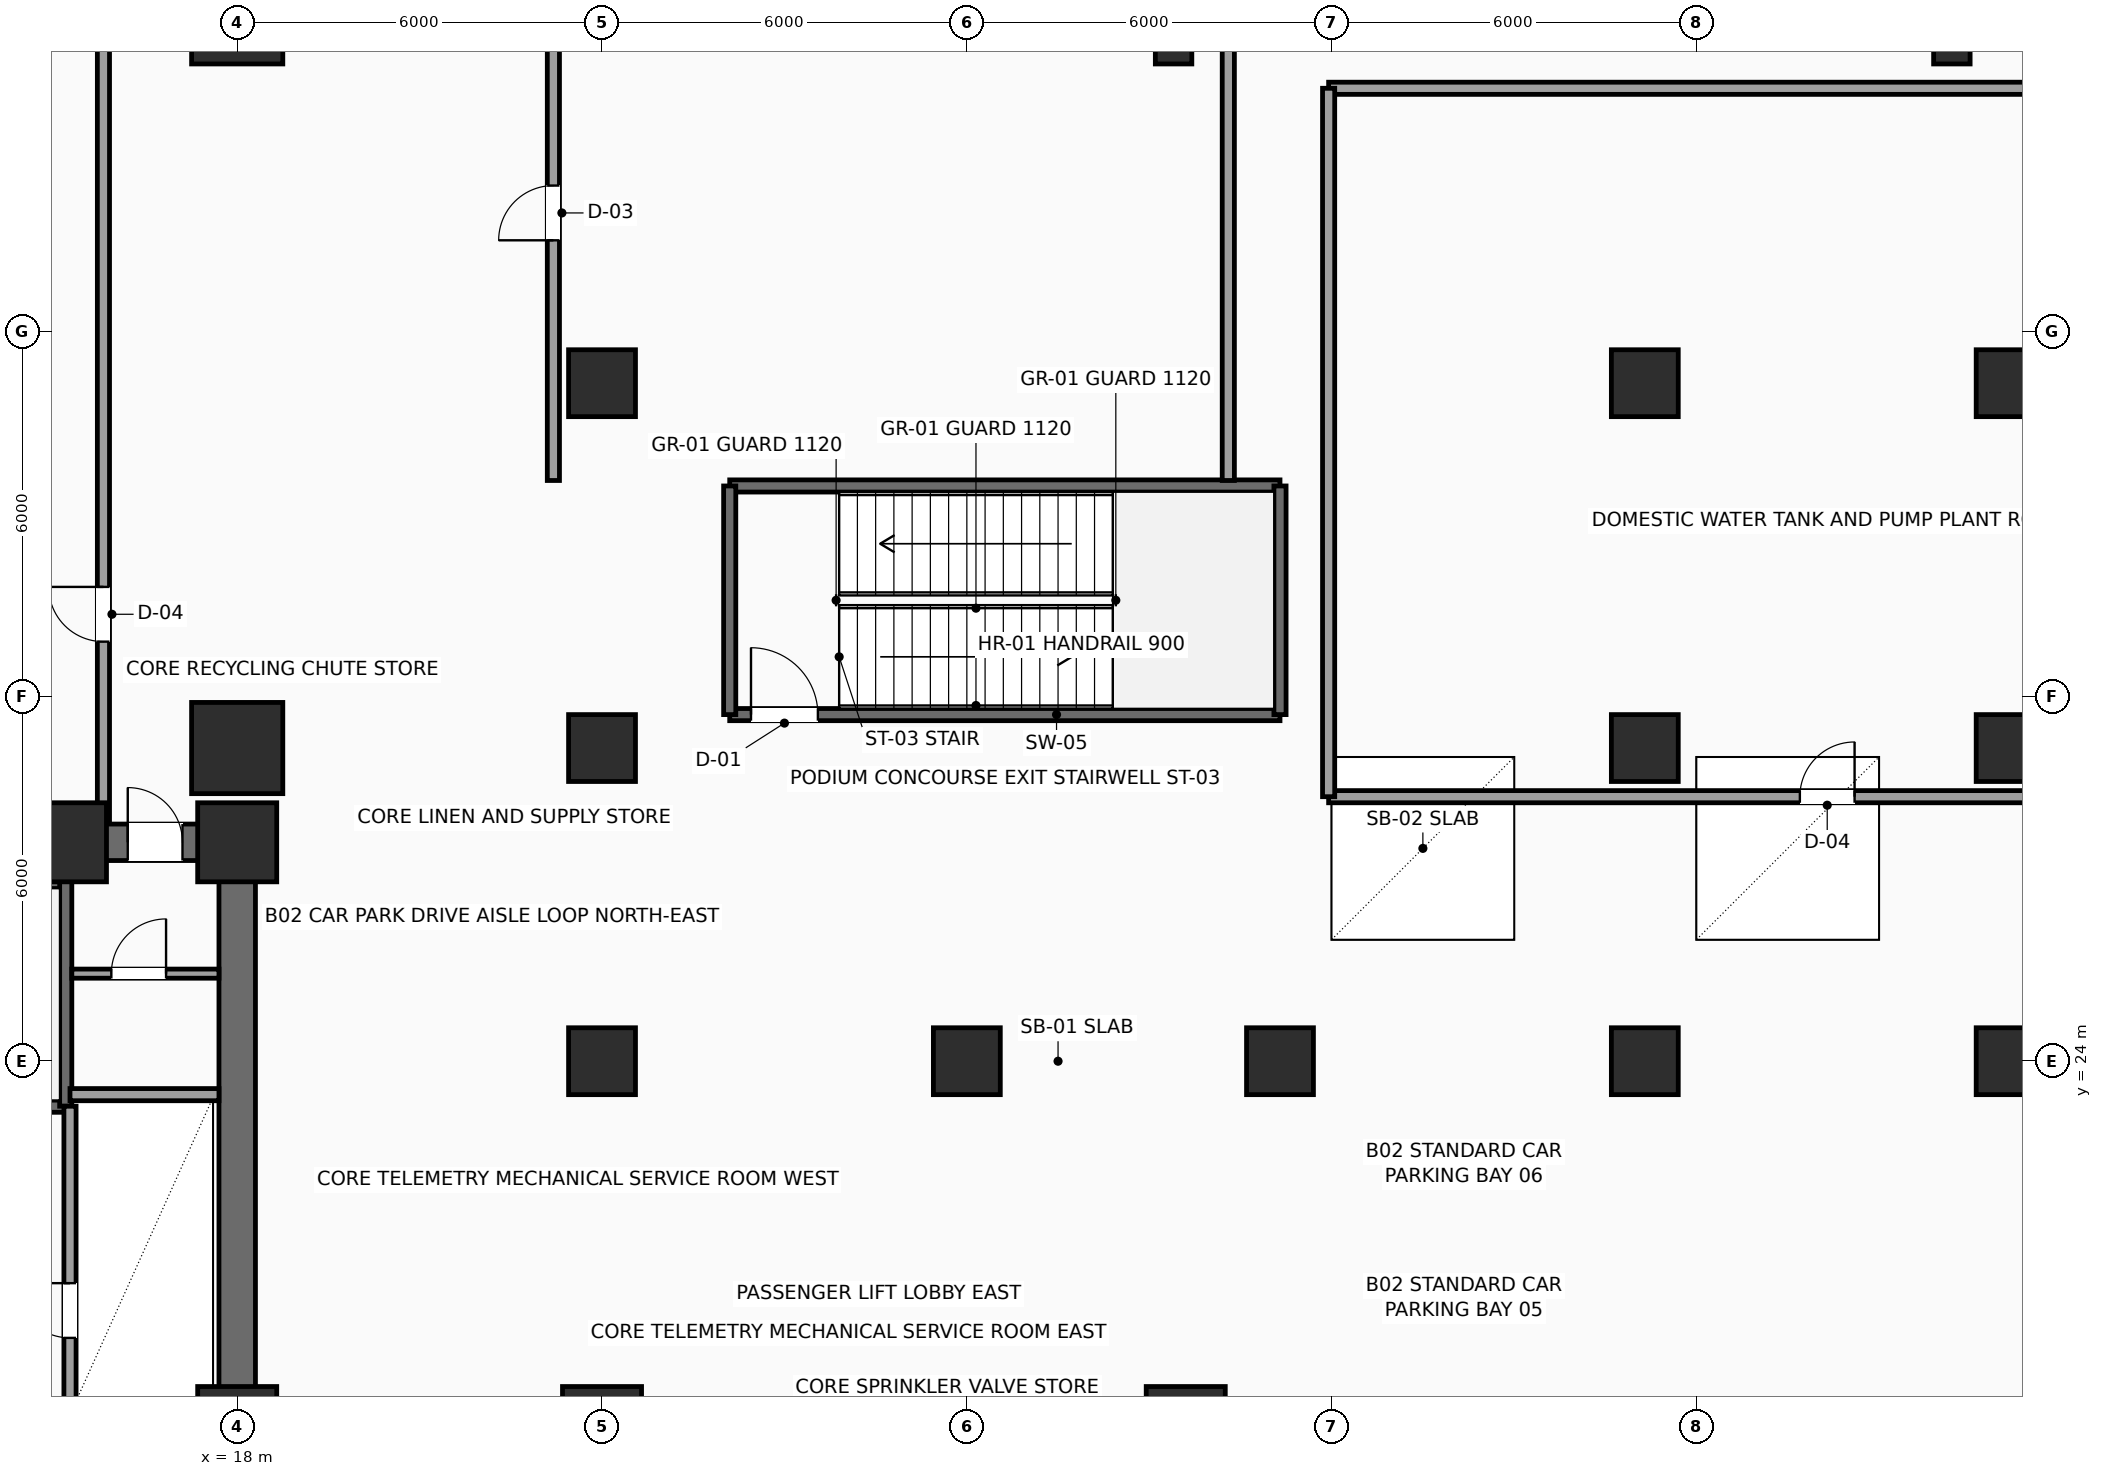
"""IFC4 building model, lengths in metres.
Left out: names, types, materials, properties, quantities, classifications, styles, units other than length and angle.
Written with IfcOpenShell. Run it as: python <this file> out.ifc"""

import sys

from ifc_helpers import new_model, si_unit, direction, frame, frame_2d, origin, origin_2d, place, context, subcontext, project, spatial, rectangle, extrude, element, fill, save


model = new_model("IFC4")
c1 = context("Model", 3, precision=1e-05, world=origin(), true_north=direction((0.0, 1.0)))
c2 = subcontext(c1, "Body", "Model", "MODEL_VIEW")
j1 = project(units=[si_unit("LENGTHUNIT", "METRE"), si_unit("PLANEANGLEUNIT", "RADIAN")], contexts=[c1])
p1 = place(None, origin())
s1 = spatial("IfcSite", under=j1, at=p1, CompositionType="ELEMENT")
p2 = place(p1, origin())
s2 = spatial("IfcBuilding", under=s1, at=p2, CompositionType="ELEMENT")
p3 = place(p2, frame((0.0, 0.0, -9.6)))
s3 = spatial("IfcBuildingStorey", under=s2, at=p3, CompositionType="ELEMENT", Elevation=-9.6)
for number, where, z_axis, x_axis in (
    (1, (18.0, 18.0, 0.0), (0.0, 0.0, 1.0), (1.0, 0.0, 0.0)),
    (2, (15.2, 27.6, 0.0), (0.0, 0.0, 1.0), (1.0, 0.0, 0.0)),
    (3, (18.0, 27.6, 0.0), (0.0, 0.0, 1.0), (1.0, 0.0, 0.0)),
    (4, (24.0, 18.0, 0.0), (0.0, 0.0, 1.0), (1.0, 0.0, 0.0)),
    (5, (33.6, 18.0, 0.0), (0.0, 0.0, 1.0), (1.0, 0.0, 0.0)),
):
    element("IfcColumn", number, at=place(p3, frame(where, z_axis=z_axis, x_axis=x_axis)), inside=s3, PredefinedType="COLUMN", context=c2, shape_type="SweptSolid", body=[
        extrude(rectangle(XDim=1.3, YDim=1.3, at=origin_2d()), origin(), (0.0, 0.0, 1.0), 4.8),
    ])
for number, where, z_axis, x_axis in (
    (6, (18.0, 29.15, 0.0), (0.0, 0.0, 1.0), (1.0, 0.0, 0.0)),
    (7, (18.0, 41.15, 0.0), (0.0, 0.0, 1.0), (1.0, 0.0, 0.0)),
):
    element("IfcColumn", number, at=place(p3, frame(where, z_axis=z_axis, x_axis=x_axis)), inside=s3, PredefinedType="COLUMN", context=c2, shape_type="SweptSolid", body=[
        extrude(rectangle(XDim=1.5, YDim=1.5, at=origin_2d()), origin(), (0.0, 0.0, 1.0), 4.8),
    ])
for number, where, z_axis, x_axis in (
    (8, (24.0, 24.0, 0.0), (0.0, 0.0, 1.0), (1.0, 0.0, 0.0)),
    (9, (24.0, 29.15, 0.0), (0.0, 0.0, 1.0), (1.0, 0.0, 0.0)),
    (10, (24.0, 35.15, 0.0), (0.0, 0.0, 1.0), (1.0, 0.0, 0.0)),
    (11, (30.0, 24.0, 0.0), (0.0, 0.0, 1.0), (1.0, 0.0, 0.0)),
    (12, (35.15, 24.0, 0.0), (0.0, 0.0, 1.0), (1.0, 0.0, 0.0)),
    (13, (41.15, 24.0, 0.0), (0.0, 0.0, 1.0), (1.0, 0.0, 0.0)),
    (14, (41.15, 29.15, 0.0), (0.0, 0.0, 1.0), (1.0, 0.0, 0.0)),
    (15, (41.15, 35.15, 0.0), (0.0, 0.0, 1.0), (1.0, 0.0, 0.0)),
    (16, (47.15, 24.0, 0.0), (0.0, 0.0, 1.0), (1.0, 0.0, 0.0)),
    (17, (47.15, 29.15, 0.0), (0.0, 0.0, 1.0), (1.0, 0.0, 0.0)),
    (18, (47.15, 35.15, 0.0), (0.0, 0.0, 1.0), (1.0, 0.0, 0.0)),
):
    element("IfcColumn", number, at=place(p3, frame(where, z_axis=z_axis, x_axis=x_axis)), inside=s3, PredefinedType="COLUMN", context=c2, shape_type="SweptSolid", body=[
        extrude(rectangle(XDim=1.1, YDim=1.1, at=origin_2d()), origin(), (0.0, 0.0, 1.0), 4.8),
    ])
for number, where, z_axis, x_axis in (
    (19, (33.4, 40.85, 0.0), (0.0, 0.0, 1.0), (1.0, 0.0, 0.0)),
    (20, (46.2, 40.85, 0.0), (0.0, 0.0, 1.0), (1.0, 0.0, 0.0)),
):
    element("IfcColumn", number, at=place(p3, frame(where, z_axis=z_axis, x_axis=x_axis)), inside=s3, PredefinedType="COLUMN", context=c2, shape_type="SweptSolid", body=[
        extrude(rectangle(XDim=0.6, YDim=0.9, at=origin_2d()), origin(), (0.0, 0.0, 1.0), 4.8),
    ])
p4 = place(p3, frame((6.0, 27.6, 0.0), z_axis=(0.0, 0.0, 1.0), x_axis=(1.0, 0.0, 0.0)))
e21 = element("IfcWall", 21, at=p4, inside=s3, PredefinedType="SHEAR", context=c2, shape_type="SweptSolid", body=[
    extrude(rectangle(XDim=12.0, YDim=0.6, at=frame_2d((6.0, 0.0))), origin(), (0.0, 0.0, 1.0), 4.475),
])
p5 = place(p4, frame((10.2, 0.0, 0.0)))
e22 = element("IfcOpeningElement", 22, at=p5, cuts=e21, PredefinedType="OPENING", context=c2, shape_type="SweptSolid", body=[
    extrude(rectangle(XDim=0.9, YDim=2.15, at=frame_2d((0.45, 1.075))), frame((0.0, 0.31, 0.0), z_axis=(0.0, -1.0, 0.0), x_axis=(1.0, 0.0, 0.0)), (0.0, 0.0, 1.0), 0.62),
])
p6 = place(p3, frame((18.0, 18.0, 0.0), z_axis=(0.0, 0.0, 1.0), x_axis=(0.0, 1.0, 0.0)))
e23 = element("IfcWall", 23, at=p6, inside=s3, PredefinedType="SHEAR", context=c2, shape_type="SweptSolid", body=[
    extrude(rectangle(XDim=9.6, YDim=0.6, at=frame_2d((4.8, 0.0))), origin(), (0.0, 0.0, 1.0), 4.475),
])
p7 = place(p3, frame((6.3, 23.26, 0.0), z_axis=(0.0, 0.0, 1.0), x_axis=(1.0, 0.0, 0.0)))
e24 = element("IfcWall", 24, at=p7, inside=s3, PredefinedType="SHEAR", context=c2, shape_type="SweptSolid", body=[
    extrude(rectangle(XDim=8.88, YDim=0.2, at=frame_2d((4.44, 0.0))), origin(), (0.0, 0.0, 1.0), 4.475),
])
p8 = place(p7, frame((0.35, 0.0, 0.0)))
e25 = element("IfcOpeningElement", 25, at=p8, cuts=e24, PredefinedType="OPENING", context=c2, shape_type="SweptSolid", body=[
    extrude(rectangle(XDim=1.1, YDim=2.2, at=frame_2d((0.55, 1.1))), frame((0.0, 0.11, 0.0), z_axis=(0.0, -1.0, 0.0), x_axis=(1.0, 0.0, 0.0)), (0.0, 0.0, 1.0), 0.22),
])
p9 = place(p3, frame((6.3, 26.94, 0.0), z_axis=(0.0, 0.0, 1.0), x_axis=(1.0, 0.0, 0.0)))
e26 = element("IfcWall", 26, at=p9, inside=s3, PredefinedType="SHEAR", context=c2, shape_type="SweptSolid", body=[
    extrude(rectangle(XDim=8.88, YDim=0.2, at=frame_2d((4.44, 0.0))), origin(), (0.0, 0.0, 1.0), 4.475),
])
p10 = place(p3, frame((15.18, 23.26, 0.0), z_axis=(0.0, 0.0, 1.0), x_axis=(0.0, 1.0, 0.0)))
e27 = element("IfcWall", 27, at=p10, inside=s3, PredefinedType="SHEAR", context=c2, shape_type="SweptSolid", body=[
    extrude(rectangle(XDim=4.04, YDim=0.2, at=frame_2d((2.02, 0.0))), origin(), (0.0, 0.0, 1.0), 4.475),
])
p11 = place(p3, frame((15.25, 18.25, 0.0), z_axis=(0.0, 0.0, 1.0), x_axis=(0.0, 1.0, 0.0)))
e28 = element("IfcWall", 28, at=p11, inside=s3, PredefinedType="SOLIDWALL", context=c2, shape_type="SweptSolid", body=[
    extrude(rectangle(XDim=5.01, YDim=0.2, at=frame_2d((2.505, 0.0))), origin(), (0.0, 0.0, 1.0), 4.475),
])
p12 = place(p11, frame((1.2, 0.0, 0.0)))
e29 = element("IfcOpeningElement", 29, at=p12, cuts=e28, PredefinedType="OPENING", context=c2, shape_type="SweptSolid", body=[
    extrude(rectangle(XDim=0.9, YDim=2.15, at=frame_2d((0.45, 1.075))), frame((0.0, 0.11, 0.0), z_axis=(0.0, -1.0, 0.0), x_axis=(1.0, 0.0, 0.0)), (0.0, 0.0, 1.0), 0.22),
])
p13 = place(p3, frame((15.25, 23.45, 0.0), z_axis=(0.0, 0.0, 1.0), x_axis=(1.0, 0.0, 0.0)))
e30 = element("IfcWall", 30, at=p13, inside=s3, PredefinedType="SOLIDWALL", context=c2, shape_type="SweptSolid", body=[
    extrude(rectangle(XDim=2.45, YDim=0.2, at=frame_2d((1.225, 0.0))), origin(), (0.0, 0.0, 1.0), 4.475),
])
p14 = place(p3, frame((15.28, 25.44, 0.0), z_axis=(0.0, 0.0, 1.0), x_axis=(1.0, 0.0, 0.0)))
e31 = element("IfcWall", 31, at=p14, inside=s3, PredefinedType="PARTITIONING", context=c2, shape_type="SweptSolid", body=[
    extrude(rectangle(XDim=2.42, YDim=0.15, at=frame_2d((1.21, 0.0))), origin(), (0.0, 0.0, 1.0), 4.475),
])
p15 = place(p14, frame((0.65, 0.0, 0.0)))
e32 = element("IfcOpeningElement", 32, at=p15, cuts=e31, PredefinedType="OPENING", context=c2, shape_type="SweptSolid", body=[
    extrude(rectangle(XDim=0.9, YDim=2.15, at=frame_2d((0.45, 1.075))), frame((0.0, 0.085, 0.0), z_axis=(0.0, -1.0, 0.0), x_axis=(1.0, 0.0, 0.0)), (0.0, 0.0, 1.0), 0.17),
])
p16 = place(p3, frame((26.1, 29.7, 0.0), z_axis=(0.0, 0.0, 1.0), x_axis=(1.0, 0.0, 0.0)))
e33 = element("IfcWall", 33, at=p16, inside=s3, PredefinedType="SHEAR", context=c2, shape_type="SweptSolid", body=[
    extrude(rectangle(XDim=9.05, YDim=0.2, at=frame_2d((4.525, 0.0))), origin(), (0.0, 0.0, 1.0), 4.475),
])
p17 = place(p16, frame((0.35, 0.0, 0.0)))
e34 = element("IfcOpeningElement", 34, at=p17, cuts=e33, PredefinedType="OPENING", context=c2, shape_type="SweptSolid", body=[
    extrude(rectangle(XDim=1.1, YDim=2.2, at=frame_2d((0.55, 1.1))), frame((0.0, 0.11, 0.0), z_axis=(0.0, -1.0, 0.0), x_axis=(1.0, 0.0, 0.0)), (0.0, 0.0, 1.0), 0.22),
])
p18 = place(p3, frame((26.1, 33.46, 0.0), z_axis=(0.0, 0.0, 1.0), x_axis=(1.0, 0.0, 0.0)))
e35 = element("IfcWall", 35, at=p18, inside=s3, PredefinedType="SHEAR", context=c2, shape_type="SweptSolid", body=[
    extrude(rectangle(XDim=9.05, YDim=0.2, at=frame_2d((4.525, 0.0))), origin(), (0.0, 0.0, 1.0), 4.475),
])
for number, where, z_axis, x_axis in (
    (36, (26.1, 29.7, 0.0), (0.0, 0.0, 1.0), (0.0, 1.0, 0.0)),
    (37, (35.15, 29.7, 0.0), (0.0, 0.0, 1.0), (0.0, 1.0, 0.0)),
):
    element("IfcWall", number, at=place(p3, frame(where, z_axis=z_axis, x_axis=x_axis)), inside=s3, PredefinedType="SHEAR", context=c2, shape_type="SweptSolid", body=[
        extrude(rectangle(XDim=3.76, YDim=0.2, at=frame_2d((1.88, 0.0))), origin(), (0.0, 0.0, 1.0), 4.475),
    ])
p19 = place(p3, frame((15.8, 27.92, 0.0), z_axis=(0.0, 0.0, 1.0), x_axis=(0.0, 1.0, 0.0)))
e38 = element("IfcWall", 38, at=p19, inside=s3, PredefinedType="SOLIDWALL", context=c2, shape_type="SweptSolid", body=[
    extrude(rectangle(XDim=16.96, YDim=0.2, at=frame_2d((8.48, 0.0))), origin(), (0.0, 0.0, 1.0), 4.475),
])
p20 = place(p19, frame((2.98, 0.0, 0.0)))
e39 = element("IfcOpeningElement", 39, at=p20, cuts=e38, PredefinedType="OPENING", context=c2, shape_type="SweptSolid", body=[
    extrude(rectangle(XDim=0.9, YDim=2.15, at=frame_2d((0.45, 1.075))), frame((0.0, 0.11, 0.0), z_axis=(0.0, -1.0, 0.0), x_axis=(1.0, 0.0, 0.0)), (0.0, 0.0, 1.0), 0.22),
])
p21 = place(p3, frame((35.95, 28.35, 0.0), z_axis=(0.0, 0.0, 1.0), x_axis=(1.0, 0.0, 0.0)))
e40 = element("IfcWall", 40, at=p21, inside=s3, PredefinedType="SOLIDWALL", context=c2, shape_type="SweptSolid", body=[
    extrude(rectangle(XDim=16.35, YDim=0.2, at=frame_2d((8.175, 0.0))), origin(), (0.0, 0.0, 1.0), 4.475),
])
p22 = place(p21, frame((7.75, 0.0, 0.0)))
e41 = element("IfcOpeningElement", 41, at=p22, cuts=e40, PredefinedType="OPENING", context=c2, shape_type="SweptSolid", body=[
    extrude(rectangle(XDim=0.9, YDim=2.15, at=frame_2d((0.45, 1.075))), frame((0.0, 0.11, 0.0), z_axis=(0.0, -1.0, 0.0), x_axis=(1.0, 0.0, 0.0)), (0.0, 0.0, 1.0), 0.22),
])
p23 = place(p3, frame((35.95, 40.0, 0.0), z_axis=(0.0, 0.0, 1.0), x_axis=(1.0, 0.0, 0.0)))
e42 = element("IfcWall", 42, at=p23, inside=s3, PredefinedType="SOLIDWALL", context=c2, shape_type="SweptSolid", body=[
    extrude(rectangle(XDim=16.35, YDim=0.2, at=frame_2d((8.175, 0.0))), origin(), (0.0, 0.0, 1.0), 4.475),
])
p24 = place(p3, frame((35.95, 28.35, 0.0), z_axis=(0.0, 0.0, 1.0), x_axis=(0.0, 1.0, 0.0)))
e43 = element("IfcWall", 43, at=p24, inside=s3, PredefinedType="SOLIDWALL", context=c2, shape_type="SweptSolid", body=[
    extrude(rectangle(XDim=11.65, YDim=0.2, at=frame_2d((5.825, 0.0))), origin(), (0.0, 0.0, 1.0), 4.475),
])
p25 = place(p3, frame((23.2, 33.55, 0.0), z_axis=(0.0, 0.0, 1.0), x_axis=(0.0, 1.0, 0.0)))
e44 = element("IfcWall", 44, at=p25, inside=s3, PredefinedType="SOLIDWALL", context=c2, shape_type="SweptSolid", body=[
    extrude(rectangle(XDim=13.33, YDim=0.2, at=frame_2d((6.665, 0.0))), origin(), (0.0, 0.0, 1.0), 4.475),
])
p26 = place(p25, frame((3.95, 0.0, 0.0)))
e45 = element("IfcOpeningElement", 45, at=p26, cuts=e44, PredefinedType="OPENING", context=c2, shape_type="SweptSolid", body=[
    extrude(rectangle(XDim=0.9, YDim=2.15, at=frame_2d((0.45, 1.075))), frame((0.0, 0.11, 0.0), z_axis=(0.0, -1.0, 0.0), x_axis=(1.0, 0.0, 0.0)), (0.0, 0.0, 1.0), 0.22),
])
p27 = place(p3, frame((34.3, 33.55, 0.0), z_axis=(0.0, 0.0, 1.0), x_axis=(0.0, 1.0, 0.0)))
e46 = element("IfcWall", 46, at=p27, inside=s3, PredefinedType="SOLIDWALL", context=c2, shape_type="SweptSolid", body=[
    extrude(rectangle(XDim=13.33, YDim=0.2, at=frame_2d((6.665, 0.0))), origin(), (0.0, 0.0, 1.0), 4.475),
])
p28 = place(p5, origin())
e47 = element("IfcDoor", 47, at=p28, inside=s3, OperationType="SINGLE_SWING_LEFT", PredefinedType="DOOR", context=c2, shape_type="SweptSolid", body=[
    extrude(rectangle(XDim=0.9, YDim=2.15, at=frame_2d((0.45, 1.075))), frame((0.0, 0.025, 0.0), z_axis=(0.0, -1.0, 0.0), x_axis=(1.0, 0.0, 0.0)), (0.0, 0.0, 1.0), 0.05),
])
fill(e22, e47)
p29 = place(p12, origin())
e48 = element("IfcDoor", 48, at=p29, inside=s3, OperationType="SINGLE_SWING_RIGHT", PredefinedType="DOOR", context=c2, shape_type="SweptSolid", body=[
    extrude(rectangle(XDim=0.9, YDim=2.15, at=frame_2d((0.45, 1.075))), frame((0.0, 0.025, 0.0), z_axis=(0.0, -1.0, 0.0), x_axis=(1.0, 0.0, 0.0)), (0.0, 0.0, 1.0), 0.05),
])
fill(e29, e48)
p30 = place(p15, origin())
e49 = element("IfcDoor", 49, at=p30, inside=s3, OperationType="SINGLE_SWING_RIGHT", PredefinedType="DOOR", context=c2, shape_type="SweptSolid", body=[
    extrude(rectangle(XDim=0.9, YDim=2.15, at=frame_2d((0.45, 1.075))), frame((0.0, 0.025, 0.0), z_axis=(0.0, -1.0, 0.0), x_axis=(1.0, 0.0, 0.0)), (0.0, 0.0, 1.0), 0.05),
])
fill(e32, e49)
p31 = place(p17, origin())
e50 = element("IfcDoor", 50, at=p31, inside=s3, OperationType="SINGLE_SWING_LEFT", PredefinedType="DOOR", context=c2, shape_type="SweptSolid", body=[
    extrude(rectangle(XDim=1.1, YDim=2.2, at=frame_2d((0.55, 1.1))), frame((0.0, 0.025, 0.0), z_axis=(0.0, -1.0, 0.0), x_axis=(1.0, 0.0, 0.0)), (0.0, 0.0, 1.0), 0.05),
])
fill(e34, e50)
p32 = place(p20, origin())
e51 = element("IfcDoor", 51, at=p32, inside=s3, OperationType="SINGLE_SWING_RIGHT", PredefinedType="DOOR", context=c2, shape_type="SweptSolid", body=[
    extrude(rectangle(XDim=0.9, YDim=2.15, at=frame_2d((0.45, 1.075))), frame((0.0, 0.025, 0.0), z_axis=(0.0, -1.0, 0.0), x_axis=(1.0, 0.0, 0.0)), (0.0, 0.0, 1.0), 0.05),
])
fill(e39, e51)
p33 = place(p22, origin())
e52 = element("IfcDoor", 52, at=p33, inside=s3, OperationType="SINGLE_SWING_RIGHT", PredefinedType="DOOR", context=c2, shape_type="SweptSolid", body=[
    extrude(rectangle(XDim=0.9, YDim=2.15, at=frame_2d((0.45, 1.075))), frame((0.0, 0.025, 0.0), z_axis=(0.0, -1.0, 0.0), x_axis=(1.0, 0.0, 0.0)), (0.0, 0.0, 1.0), 0.05),
])
fill(e41, e52)
p34 = place(p26, origin())
e53 = element("IfcDoor", 53, at=p34, inside=s3, OperationType="SINGLE_SWING_LEFT", PredefinedType="DOOR", context=c2, shape_type="SweptSolid", body=[
    extrude(rectangle(XDim=0.9, YDim=2.15, at=frame_2d((0.45, 1.075))), frame((0.0, 0.025, 0.0), z_axis=(0.0, -1.0, 0.0), x_axis=(1.0, 0.0, 0.0)), (0.0, 0.0, 1.0), 0.05),
])
fill(e45, e53)
save(model, sys.argv[1])
